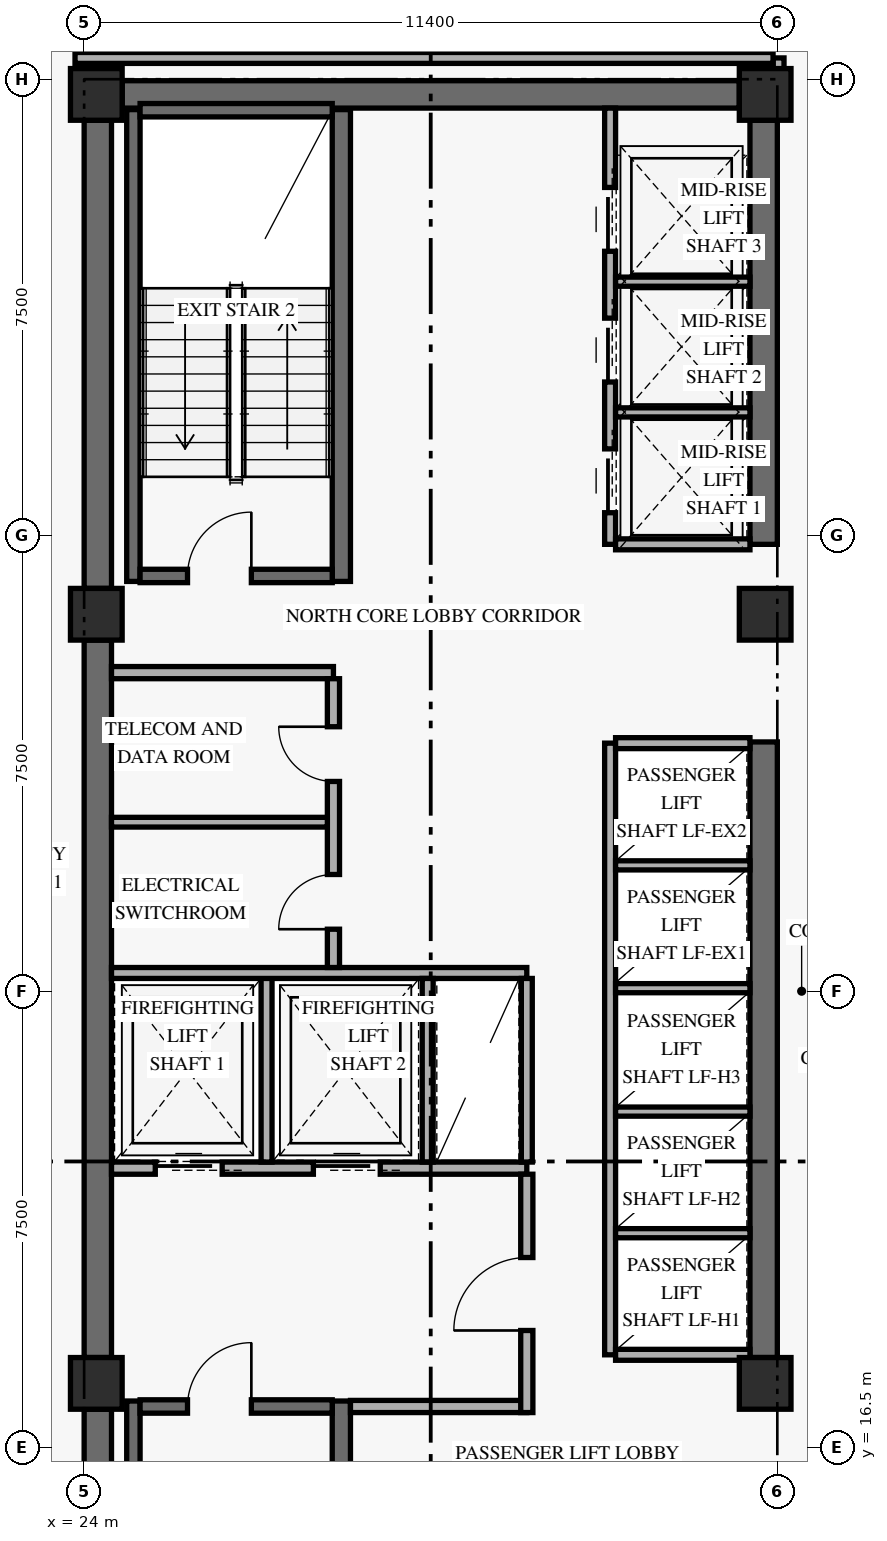
"""IFC4 building model, lengths in metres.
Left out: names, types, materials, properties, quantities, classifications, styles, units other than length and angle.
Written with IfcOpenShell. Run it as: python <this file> out.ifc"""

import sys

from ifc_helpers import new_model, si_unit, direction, frame, frame_2d, origin, origin_2d, place, context, subcontext, project, spatial, rectangle, extrude, element, fill, save


model = new_model("IFC4")
c1 = context("Model", 3, precision=1e-05, world=origin(), true_north=direction((0.0, 1.0)))
c2 = subcontext(c1, "Body", "Model", "MODEL_VIEW")
j1 = project(units=[si_unit("LENGTHUNIT", "METRE"), si_unit("PLANEANGLEUNIT", "RADIAN")], contexts=[c1])
p1 = place(None, origin())
s1 = spatial("IfcSite", under=j1, at=p1, CompositionType="ELEMENT")
p2 = place(p1, origin())
s2 = spatial("IfcBuilding", under=s1, at=p2, CompositionType="ELEMENT")
p3 = place(p2, frame((0.0, 0.0, 98.4)))
s3 = spatial("IfcBuildingStorey", under=s2, at=p3, CompositionType="ELEMENT", Elevation=98.4)
p4 = place(p3, frame((24.225, 9.675, 0.0), z_axis=(0.0, 0.0, 1.0), x_axis=(0.0, 1.0, 0.0)))
e1 = element("IfcWall", 1, at=p4, inside=s3, PredefinedType="SHEAR", context=c2, shape_type="SweptSolid", body=[
    extrude(rectangle(XDim=7.45, YDim=0.45, at=frame_2d((3.725, 0.0))), origin(), (0.0, 0.0, 1.0), 3.349),
])
p5 = place(p3, frame((24.225, 17.975, 0.0), z_axis=(0.0, 0.0, 1.0), x_axis=(0.0, 1.0, 0.0)))
e2 = element("IfcWall", 2, at=p5, inside=s3, PredefinedType="SHEAR", context=c2, shape_type="SweptSolid", body=[
    extrude(rectangle(XDim=11.8, YDim=0.45, at=frame_2d((5.9, 0.0))), origin(), (0.0, 0.0, 1.0), 3.349),
])
p6 = place(p3, frame((24.225, 30.625, 0.0), z_axis=(0.0, 0.0, 1.0), x_axis=(0.0, 1.0, 0.0)))
e3 = element("IfcWall", 3, at=p6, inside=s3, PredefinedType="SHEAR", context=c2, shape_type="SweptSolid", body=[
    extrude(rectangle(XDim=7.7, YDim=0.45, at=frame_2d((3.85, 0.0))), origin(), (0.0, 0.0, 1.0), 3.349),
])
p7 = place(p3, frame((35.175, 17.975, 0.0), z_axis=(0.0, 0.0, 1.0), x_axis=(0.0, 1.0, 0.0)))
e4 = element("IfcWall", 4, at=p7, inside=s3, PredefinedType="SHEAR", context=c2, shape_type="SweptSolid", body=[
    extrude(rectangle(XDim=10.125, YDim=0.45, at=frame_2d((5.062, 0.0))), origin(), (0.0, 0.0, 1.0), 3.349),
])
p8 = place(p3, frame((35.175, 31.35, 0.0), z_axis=(0.0, 0.0, 1.0), x_axis=(0.0, 1.0, 0.0)))
e5 = element("IfcWall", 5, at=p8, inside=s3, PredefinedType="SHEAR", context=c2, shape_type="SweptSolid", body=[
    extrude(rectangle(XDim=6.975, YDim=0.45, at=frame_2d((3.487, 0.0))), origin(), (0.0, 0.0, 1.0), 3.349),
])
p9 = place(p3, frame((24.625, 38.75, 0.0), z_axis=(0.0, 0.0, 1.0), x_axis=(1.0, 0.0, 0.0)))
e6 = element("IfcWall", 6, at=p9, inside=s3, PredefinedType="SHEAR", context=c2, shape_type="SweptSolid", body=[
    extrude(rectangle(XDim=10.15, YDim=0.45, at=frame_2d((5.075, 0.0))), origin(), (0.0, 0.0, 1.0), 3.96),
])
p10 = place(p3, frame((24.81, 9.5, 0.0), z_axis=(0.0, 0.0, 1.0), x_axis=(0.0, 1.0, 0.0)))
e7 = element("IfcWall", 7, at=p10, inside=s3, PredefinedType="SHEAR", context=c2, shape_type="SweptSolid", body=[
    extrude(rectangle(XDim=7.76, YDim=0.22, at=frame_2d((3.88, 0.0))), origin(), (0.0, 0.0, 1.0), 3.96),
])
p11 = place(p3, frame((28.23, 9.5, 0.0), z_axis=(0.0, 0.0, 1.0), x_axis=(0.0, 1.0, 0.0)))
e8 = element("IfcWall", 8, at=p11, inside=s3, PredefinedType="SHEAR", context=c2, shape_type="SweptSolid", body=[
    extrude(rectangle(XDim=7.76, YDim=0.3, at=frame_2d((3.88, 0.0))), origin(), (0.0, 0.0, 1.0), 3.96),
])
p12 = place(p3, frame((24.92, 17.17, 0.0), z_axis=(0.0, 0.0, 1.0), x_axis=(1.0, 0.0, 0.0)))
e9 = element("IfcWall", 9, at=p12, inside=s3, PredefinedType="SHEAR", context=c2, shape_type="SweptSolid", body=[
    extrude(rectangle(XDim=3.16, YDim=0.22, at=frame_2d((1.58, 0.0))), origin(), (0.0, 0.0, 1.0), 3.96),
])
p13 = place(p12, frame((0.78, 0.0, 0.0)))
e10 = element("IfcOpeningElement", 10, at=p13, cuts=e9, PredefinedType="OPENING", context=c2, shape_type="SweptSolid", body=[
    extrude(rectangle(XDim=1.05, YDim=2.15, at=frame_2d((0.525, 1.075))), frame((0.0, 0.12, 0.0), z_axis=(0.0, -1.0, 0.0), x_axis=(1.0, 0.0, 0.0)), (0.0, 0.0, 1.0), 0.24),
])
p14 = place(p3, frame((24.81, 30.74, 0.0), z_axis=(0.0, 0.0, 1.0), x_axis=(0.0, 1.0, 0.0)))
e11 = element("IfcWall", 11, at=p14, inside=s3, PredefinedType="SHEAR", context=c2, shape_type="SweptSolid", body=[
    extrude(rectangle(XDim=7.76, YDim=0.22, at=frame_2d((3.88, 0.0))), origin(), (0.0, 0.0, 1.0), 3.96),
])
p15 = place(p3, frame((28.23, 30.74, 0.0), z_axis=(0.0, 0.0, 1.0), x_axis=(0.0, 1.0, 0.0)))
e12 = element("IfcWall", 12, at=p15, inside=s3, PredefinedType="SHEAR", context=c2, shape_type="SweptSolid", body=[
    extrude(rectangle(XDim=7.76, YDim=0.3, at=frame_2d((3.88, 0.0))), origin(), (0.0, 0.0, 1.0), 3.96),
])
p16 = place(p3, frame((24.92, 30.83, 0.0), z_axis=(0.0, 0.0, 1.0), x_axis=(1.0, 0.0, 0.0)))
e13 = element("IfcWall", 13, at=p16, inside=s3, PredefinedType="SHEAR", context=c2, shape_type="SweptSolid", body=[
    extrude(rectangle(XDim=3.16, YDim=0.22, at=frame_2d((1.58, 0.0))), origin(), (0.0, 0.0, 1.0), 3.96),
])
p17 = place(p16, frame((0.78, 0.0, 0.0)))
e14 = element("IfcOpeningElement", 14, at=p17, cuts=e13, PredefinedType="OPENING", context=c2, shape_type="SweptSolid", body=[
    extrude(rectangle(XDim=1.05, YDim=2.15, at=frame_2d((0.525, 1.075))), frame((0.0, 0.12, 0.0), z_axis=(0.0, -1.0, 0.0), x_axis=(1.0, 0.0, 0.0)), (0.0, 0.0, 1.0), 0.24),
])
p18 = place(p3, frame((24.92, 38.49, 0.0), z_axis=(0.0, 0.0, 1.0), x_axis=(1.0, 0.0, 0.0)))
e15 = element("IfcWall", 15, at=p18, inside=s3, PredefinedType="SHEAR", context=c2, shape_type="SweptSolid", body=[
    extrude(rectangle(XDim=3.16, YDim=0.22, at=frame_2d((1.58, 0.0))), origin(), (0.0, 0.0, 1.0), 3.96),
])
for number, where, z_axis, x_axis in (
    (16, (24.2, 17.55, 0.0), (0.0, 0.0, 1.0), (1.0, 0.0, 0.0)),
    (17, (24.2, 30.2, 0.0), (0.0, 0.0, 1.0), (1.0, 0.0, 0.0)),
    (18, (24.2, 38.75, 0.0), (0.0, 0.0, 1.0), (1.0, 0.0, 0.0)),
    (19, (35.2, 17.55, 0.0), (0.0, 0.0, 1.0), (1.0, 0.0, 0.0)),
    (20, (35.2, 30.2, 0.0), (0.0, 0.0, 1.0), (1.0, 0.0, 0.0)),
    (21, (35.2, 38.75, 0.0), (0.0, 0.0, 1.0), (1.0, 0.0, 0.0)),
):
    element("IfcColumn", number, at=place(p3, frame(where, z_axis=z_axis, x_axis=x_axis)), inside=s3, PredefinedType="COLUMN", context=c2, shape_type="SweptSolid", body=[
        extrude(rectangle(XDim=0.85, YDim=0.85, at=origin_2d()), origin(), (0.0, 0.0, 1.0), 4.2),
    ])
p19 = place(p3, frame((24.45, 21.09, 0.0), z_axis=(0.0, 0.0, 1.0), x_axis=(1.0, 0.0, 0.0)))
e22 = element("IfcWall", 22, at=p19, inside=s3, PredefinedType="STANDARD", context=c2, shape_type="SweptSolid", body=[
    extrude(rectangle(XDim=6.83, YDim=0.2, at=frame_2d((3.415, 0.0))), origin(), (0.0, 0.0, 1.0), 3.96),
])
p20 = place(p19, frame((0.72, 0.0, 0.0)))
e23 = element("IfcOpeningElement", 23, at=p20, cuts=e22, PredefinedType="OPENING", context=c2, shape_type="SweptSolid", body=[
    extrude(rectangle(XDim=1.1, YDim=2.2, at=frame_2d((0.55, 1.1))), frame((0.0, 0.11, 0.0), z_axis=(0.0, -1.0, 0.0), x_axis=(1.0, 0.0, 0.0)), (0.0, 0.0, 1.0), 0.22),
])
p21 = place(p19, frame((3.32, 0.0, 0.0)))
e24 = element("IfcOpeningElement", 24, at=p21, cuts=e22, PredefinedType="OPENING", context=c2, shape_type="SweptSolid", body=[
    extrude(rectangle(XDim=1.1, YDim=2.2, at=frame_2d((0.55, 1.1))), frame((0.0, 0.11, 0.0), z_axis=(0.0, -1.0, 0.0), x_axis=(1.0, 0.0, 0.0)), (0.0, 0.0, 1.0), 0.22),
])
p22 = place(p3, frame((28.38, 17.17, 0.0), z_axis=(0.0, 0.0, 1.0), x_axis=(1.0, 0.0, 0.0)))
e25 = element("IfcWall", 25, at=p22, inside=s3, PredefinedType="STANDARD", context=c2, shape_type="SweptSolid", body=[
    extrude(rectangle(XDim=2.9, YDim=0.2, at=frame_2d((1.45, 0.0))), origin(), (0.0, 0.0, 1.0), 3.96),
])
p23 = place(p3, frame((31.28, 17.07, 0.0), z_axis=(0.0, 0.0, 1.0), x_axis=(0.0, 1.0, 0.0)))
e26 = element("IfcWall", 26, at=p23, inside=s3, PredefinedType="STANDARD", context=c2, shape_type="SweptSolid", body=[
    extrude(rectangle(XDim=3.92, YDim=0.2, at=frame_2d((1.96, 0.0))), origin(), (0.0, 0.0, 1.0), 3.331),
])
p24 = place(p23, frame((1.35, 0.0, 0.0)))
e27 = element("IfcOpeningElement", 27, at=p24, cuts=e26, PredefinedType="OPENING", context=c2, shape_type="SweptSolid", body=[
    extrude(rectangle(XDim=1.2, YDim=2.15, at=frame_2d((0.6, 1.075))), frame((0.0, 0.11, 0.0), z_axis=(0.0, -1.0, 0.0), x_axis=(1.0, 0.0, 0.0)), (0.0, 0.0, 1.0), 0.22),
])
p25 = place(p3, frame((27.0, 21.19, 0.0), z_axis=(0.0, 0.0, 1.0), x_axis=(0.0, 1.0, 0.0)))
e28 = element("IfcWall", 28, at=p25, inside=s3, PredefinedType="STANDARD", context=c2, shape_type="SweptSolid", body=[
    extrude(rectangle(XDim=3.11, YDim=0.18, at=frame_2d((1.555, 0.0))), origin(), (0.0, 0.0, 1.0), 3.96),
])
p26 = place(p3, frame((24.45, 24.3, 0.0), z_axis=(0.0, 0.0, 1.0), x_axis=(1.0, 0.0, 0.0)))
e29 = element("IfcWall", 29, at=p26, inside=s3, PredefinedType="STANDARD", context=c2, shape_type="SweptSolid", body=[
    extrude(rectangle(XDim=6.83, YDim=0.18, at=frame_2d((3.415, 0.0))), origin(), (0.0, 0.0, 1.0), 3.96),
])
for number, where, z_axis, x_axis in (
    (30, (29.65, 21.19, 0.0), (0.0, 0.0, 1.0), (0.0, 1.0, 0.0)),
    (31, (31.28, 21.19, 0.0), (0.0, 0.0, 1.0), (0.0, 1.0, 0.0)),
):
    element("IfcWall", number, at=place(p3, frame(where, z_axis=z_axis, x_axis=x_axis)), inside=s3, PredefinedType="STANDARD", context=c2, shape_type="SweptSolid", body=[
        extrude(rectangle(XDim=3.02, YDim=0.18, at=frame_2d((1.51, 0.0))), origin(), (0.0, 0.0, 1.0), 3.96),
    ])
p27 = place(p3, frame((24.45, 29.24, 0.0), z_axis=(0.0, 0.0, 1.0), x_axis=(1.0, 0.0, 0.0)))
e32 = element("IfcWall", 32, at=p27, inside=s3, PredefinedType="STANDARD", context=c2, shape_type="SweptSolid", body=[
    extrude(rectangle(XDim=3.65, YDim=0.2, at=frame_2d((1.825, 0.0))), origin(), (0.0, 0.0, 1.0), 3.96),
])
p28 = place(p3, frame((28.1, 24.39, 0.0), z_axis=(0.0, 0.0, 1.0), x_axis=(0.0, 1.0, 0.0)))
e33 = element("IfcWall", 33, at=p28, inside=s3, PredefinedType="STANDARD", context=c2, shape_type="SweptSolid", body=[
    extrude(rectangle(XDim=4.75, YDim=0.2, at=frame_2d((2.375, 0.0))), origin(), (0.0, 0.0, 1.0), 3.96),
])
p29 = place(p28, frame((0.63, 0.0, 0.0)))
e34 = element("IfcOpeningElement", 34, at=p29, cuts=e33, PredefinedType="OPENING", context=c2, shape_type="SweptSolid", body=[
    extrude(rectangle(XDim=0.9, YDim=2.1, at=frame_2d((0.45, 1.05))), frame((0.0, 0.11, 0.0), z_axis=(0.0, -1.0, 0.0), x_axis=(1.0, 0.0, 0.0)), (0.0, 0.0, 1.0), 0.22),
])
p30 = place(p28, frame((3.06, 0.0, 0.0)))
e35 = element("IfcOpeningElement", 35, at=p30, cuts=e33, PredefinedType="OPENING", context=c2, shape_type="SweptSolid", body=[
    extrude(rectangle(XDim=0.9, YDim=2.1, at=frame_2d((0.45, 1.05))), frame((0.0, 0.11, 0.0), z_axis=(0.0, -1.0, 0.0), x_axis=(1.0, 0.0, 0.0)), (0.0, 0.0, 1.0), 0.22),
])
p31 = place(p3, frame((24.45, 26.78, 0.0), z_axis=(0.0, 0.0, 1.0), x_axis=(1.0, 0.0, 0.0)))
e36 = element("IfcWall", 36, at=p31, inside=s3, PredefinedType="PARTITIONING", context=c2, shape_type="SweptSolid", body=[
    extrude(rectangle(XDim=3.55, YDim=0.16, at=frame_2d((1.775, 0.0))), origin(), (0.0, 0.0, 1.0), 3.96),
])
p32 = place(p3, frame((32.65, 18.02, 0.0), z_axis=(0.0, 0.0, 1.0), x_axis=(0.0, 1.0, 0.0)))
e37 = element("IfcWall", 37, at=p32, inside=s3, PredefinedType="STANDARD", context=c2, shape_type="SweptSolid", body=[
    extrude(rectangle(XDim=10.06, YDim=0.18, at=frame_2d((5.03, 0.0))), origin(), (0.0, 0.0, 1.0), 3.96),
])
for number, where, z_axis, x_axis in (
    (38, (32.74, 18.02, 0.0), (0.0, 0.0, 1.0), (1.0, 0.0, 0.0)),
    (39, (32.74, 28.08, 0.0), (0.0, 0.0, 1.0), (1.0, 0.0, 0.0)),
):
    element("IfcWall", number, at=place(p3, frame(where, z_axis=z_axis, x_axis=x_axis)), inside=s3, PredefinedType="STANDARD", context=c2, shape_type="SweptSolid", body=[
        extrude(rectangle(XDim=2.21, YDim=0.18, at=frame_2d((1.105, 0.0))), origin(), (0.0, 0.0, 1.0), 3.96),
    ])
for number, where, z_axis, x_axis in (
    (40, (32.74, 20.02, 0.0), (0.0, 0.0, 1.0), (1.0, 0.0, 0.0)),
    (41, (32.74, 22.02, 0.0), (0.0, 0.0, 1.0), (1.0, 0.0, 0.0)),
    (42, (32.74, 24.05, 0.0), (0.0, 0.0, 1.0), (1.0, 0.0, 0.0)),
    (43, (32.74, 26.07, 0.0), (0.0, 0.0, 1.0), (1.0, 0.0, 0.0)),
):
    element("IfcWall", number, at=place(p3, frame(where, z_axis=z_axis, x_axis=x_axis)), inside=s3, PredefinedType="STANDARD", context=c2, shape_type="SweptSolid", body=[
        extrude(rectangle(XDim=2.21, YDim=0.15, at=frame_2d((1.105, 0.0))), origin(), (0.0, 0.0, 1.0), 3.96),
    ])
p33 = place(p3, frame((32.65, 31.35, 0.0), z_axis=(0.0, 0.0, 1.0), x_axis=(0.0, 1.0, 0.0)))
e44 = element("IfcWall", 44, at=p33, inside=s3, PredefinedType="STANDARD", context=c2, shape_type="SweptSolid", body=[
    extrude(rectangle(XDim=7.175, YDim=0.18, at=frame_2d((3.587, 0.0))), origin(), (0.0, 0.0, 1.0), 3.96),
])
p34 = place(p33, frame((0.52, 0.0, 0.0)))
e45 = element("IfcOpeningElement", 45, at=p34, cuts=e44, PredefinedType="OPENING", context=c2, shape_type="SweptSolid", body=[
    extrude(rectangle(XDim=1.05, YDim=2.2, at=frame_2d((0.525, 1.1))), frame((0.0, 0.1, 0.0), z_axis=(0.0, -1.0, 0.0), x_axis=(1.0, 0.0, 0.0)), (0.0, 0.0, 1.0), 0.2),
])
p35 = place(p33, frame((2.67, 0.0, 0.0)))
e46 = element("IfcOpeningElement", 46, at=p35, cuts=e44, PredefinedType="OPENING", context=c2, shape_type="SweptSolid", body=[
    extrude(rectangle(XDim=1.05, YDim=2.2, at=frame_2d((0.525, 1.1))), frame((0.0, 0.1, 0.0), z_axis=(0.0, -1.0, 0.0), x_axis=(1.0, 0.0, 0.0)), (0.0, 0.0, 1.0), 0.2),
])
p36 = place(p33, frame((4.82, 0.0, 0.0)))
e47 = element("IfcOpeningElement", 47, at=p36, cuts=e44, PredefinedType="OPENING", context=c2, shape_type="SweptSolid", body=[
    extrude(rectangle(XDim=1.05, YDim=2.2, at=frame_2d((0.525, 1.1))), frame((0.0, 0.1, 0.0), z_axis=(0.0, -1.0, 0.0), x_axis=(1.0, 0.0, 0.0)), (0.0, 0.0, 1.0), 0.2),
])
p37 = place(p3, frame((32.74, 31.35, 0.0), z_axis=(0.0, 0.0, 1.0), x_axis=(1.0, 0.0, 0.0)))
e48 = element("IfcWall", 48, at=p37, inside=s3, PredefinedType="STANDARD", context=c2, shape_type="SweptSolid", body=[
    extrude(rectangle(XDim=2.21, YDim=0.18, at=frame_2d((1.105, 0.0))), origin(), (0.0, 0.0, 1.0), 3.96),
])
for number, where, z_axis, x_axis in (
    (49, (32.74, 33.52, 0.0), (0.0, 0.0, 1.0), (1.0, 0.0, 0.0)),
    (50, (32.74, 35.67, 0.0), (0.0, 0.0, 1.0), (1.0, 0.0, 0.0)),
):
    element("IfcWall", number, at=place(p3, frame(where, z_axis=z_axis, x_axis=x_axis)), inside=s3, PredefinedType="STANDARD", context=c2, shape_type="SweptSolid", body=[
        extrude(rectangle(XDim=2.21, YDim=0.15, at=frame_2d((1.105, 0.0))), origin(), (0.0, 0.0, 1.0), 3.96),
    ])
p38 = place(p3, frame((35.42, 38.75, 0.0), z_axis=(0.0, 0.0, 1.0), x_axis=(0.0, 1.0, 0.0)))
e51 = element("IfcWall", 51, at=p38, inside=s3, PredefinedType="STANDARD", context=c2, shape_type="SweptSolid", body=[
    extrude(rectangle(XDim=0.6, YDim=0.18, at=frame_2d((0.3, 0.0))), origin(), (0.0, 0.0, 1.0), 3.331),
])
p39 = place(p3, frame((23.85, 39.35, 0.0), z_axis=(0.0, 0.0, 1.0), x_axis=(1.0, 0.0, 0.0)))
e52 = element("IfcWall", 52, at=p39, inside=s3, PredefinedType="STANDARD", context=c2, shape_type="SweptSolid", body=[
    extrude(rectangle(XDim=11.48, YDim=0.18, at=frame_2d((5.74, 0.0))), origin(), (0.0, 0.0, 1.0), 3.331),
])
p40 = place(p13, frame((1.05, 0.0, 0.0), z_axis=(0.0, 0.0, 1.0), x_axis=(-1.0, 0.0, 0.0)))
e53 = element("IfcDoor", 53, at=p40, inside=s3, OperationType="SINGLE_SWING_LEFT", PredefinedType="DOOR", context=c2, shape_type="SweptSolid", body=[
    extrude(rectangle(XDim=1.05, YDim=2.15, at=frame_2d((0.525, 1.075))), frame((0.0, 0.025, 0.0), z_axis=(0.0, -1.0, 0.0), x_axis=(1.0, 0.0, 0.0)), (0.0, 0.0, 1.0), 0.05),
])
fill(e10, e53)
p41 = place(p17, origin())
e54 = element("IfcDoor", 54, at=p41, inside=s3, OperationType="SINGLE_SWING_RIGHT", PredefinedType="DOOR", context=c2, shape_type="SweptSolid", body=[
    extrude(rectangle(XDim=1.05, YDim=2.15, at=frame_2d((0.525, 1.075))), frame((0.0, 0.025, 0.0), z_axis=(0.0, -1.0, 0.0), x_axis=(1.0, 0.0, 0.0)), (0.0, 0.0, 1.0), 0.05),
])
fill(e14, e54)
p42 = place(p20, origin())
e55 = element("IfcDoor", 55, at=p42, inside=s3, OperationType="SLIDING_TO_LEFT", PredefinedType="DOOR", context=c2, shape_type="SweptSolid", body=[
    extrude(rectangle(XDim=1.1, YDim=2.2, at=frame_2d((0.55, 1.1))), frame((0.0, 0.025, 0.0), z_axis=(0.0, -1.0, 0.0), x_axis=(1.0, 0.0, 0.0)), (0.0, 0.0, 1.0), 0.05),
])
fill(e23, e55)
p43 = place(p21, origin())
e56 = element("IfcDoor", 56, at=p43, inside=s3, OperationType="SLIDING_TO_LEFT", PredefinedType="DOOR", context=c2, shape_type="SweptSolid", body=[
    extrude(rectangle(XDim=1.1, YDim=2.2, at=frame_2d((0.55, 1.1))), frame((0.0, 0.025, 0.0), z_axis=(0.0, -1.0, 0.0), x_axis=(1.0, 0.0, 0.0)), (0.0, 0.0, 1.0), 0.05),
])
fill(e24, e56)
p44 = place(p24, origin())
e57 = element("IfcDoor", 57, at=p44, inside=s3, OperationType="SINGLE_SWING_LEFT", PredefinedType="DOOR", context=c2, shape_type="SweptSolid", body=[
    extrude(rectangle(XDim=1.2, YDim=2.15, at=frame_2d((0.6, 1.075))), frame((0.0, 0.025, 0.0), z_axis=(0.0, -1.0, 0.0), x_axis=(1.0, 0.0, 0.0)), (0.0, 0.0, 1.0), 0.05),
])
fill(e27, e57)
p45 = place(p29, origin())
e58 = element("IfcDoor", 58, at=p45, inside=s3, OperationType="SINGLE_SWING_LEFT", PredefinedType="DOOR", context=c2, shape_type="SweptSolid", body=[
    extrude(rectangle(XDim=0.9, YDim=2.1, at=frame_2d((0.45, 1.05))), frame((0.0, 0.025, 0.0), z_axis=(0.0, -1.0, 0.0), x_axis=(1.0, 0.0, 0.0)), (0.0, 0.0, 1.0), 0.05),
])
fill(e34, e58)
p46 = place(p30, origin())
e59 = element("IfcDoor", 59, at=p46, inside=s3, OperationType="SINGLE_SWING_RIGHT", PredefinedType="DOOR", context=c2, shape_type="SweptSolid", body=[
    extrude(rectangle(XDim=0.9, YDim=2.1, at=frame_2d((0.45, 1.05))), frame((0.0, 0.025, 0.0), z_axis=(0.0, -1.0, 0.0), x_axis=(1.0, 0.0, 0.0)), (0.0, 0.0, 1.0), 0.05),
])
fill(e35, e59)
p47 = place(p34, origin())
e60 = element("IfcDoor", 60, at=p47, inside=s3, OperationType="SLIDING_TO_LEFT", PredefinedType="DOOR", context=c2, shape_type="SweptSolid", body=[
    extrude(rectangle(XDim=1.05, YDim=2.2, at=frame_2d((0.525, 1.1))), frame((0.0, 0.025, 0.0), z_axis=(0.0, -1.0, 0.0), x_axis=(1.0, 0.0, 0.0)), (0.0, 0.0, 1.0), 0.05),
])
fill(e45, e60)
p48 = place(p35, origin())
e61 = element("IfcDoor", 61, at=p48, inside=s3, OperationType="SLIDING_TO_LEFT", PredefinedType="DOOR", context=c2, shape_type="SweptSolid", body=[
    extrude(rectangle(XDim=1.05, YDim=2.2, at=frame_2d((0.525, 1.1))), frame((0.0, 0.025, 0.0), z_axis=(0.0, -1.0, 0.0), x_axis=(1.0, 0.0, 0.0)), (0.0, 0.0, 1.0), 0.05),
])
fill(e46, e61)
p49 = place(p36, origin())
e62 = element("IfcDoor", 62, at=p49, inside=s3, OperationType="SLIDING_TO_LEFT", PredefinedType="DOOR", context=c2, shape_type="SweptSolid", body=[
    extrude(rectangle(XDim=1.05, YDim=2.2, at=frame_2d((0.525, 1.1))), frame((0.0, 0.025, 0.0), z_axis=(0.0, -1.0, 0.0), x_axis=(1.0, 0.0, 0.0)), (0.0, 0.0, 1.0), 0.05),
])
fill(e47, e62)
save(model, sys.argv[1])
